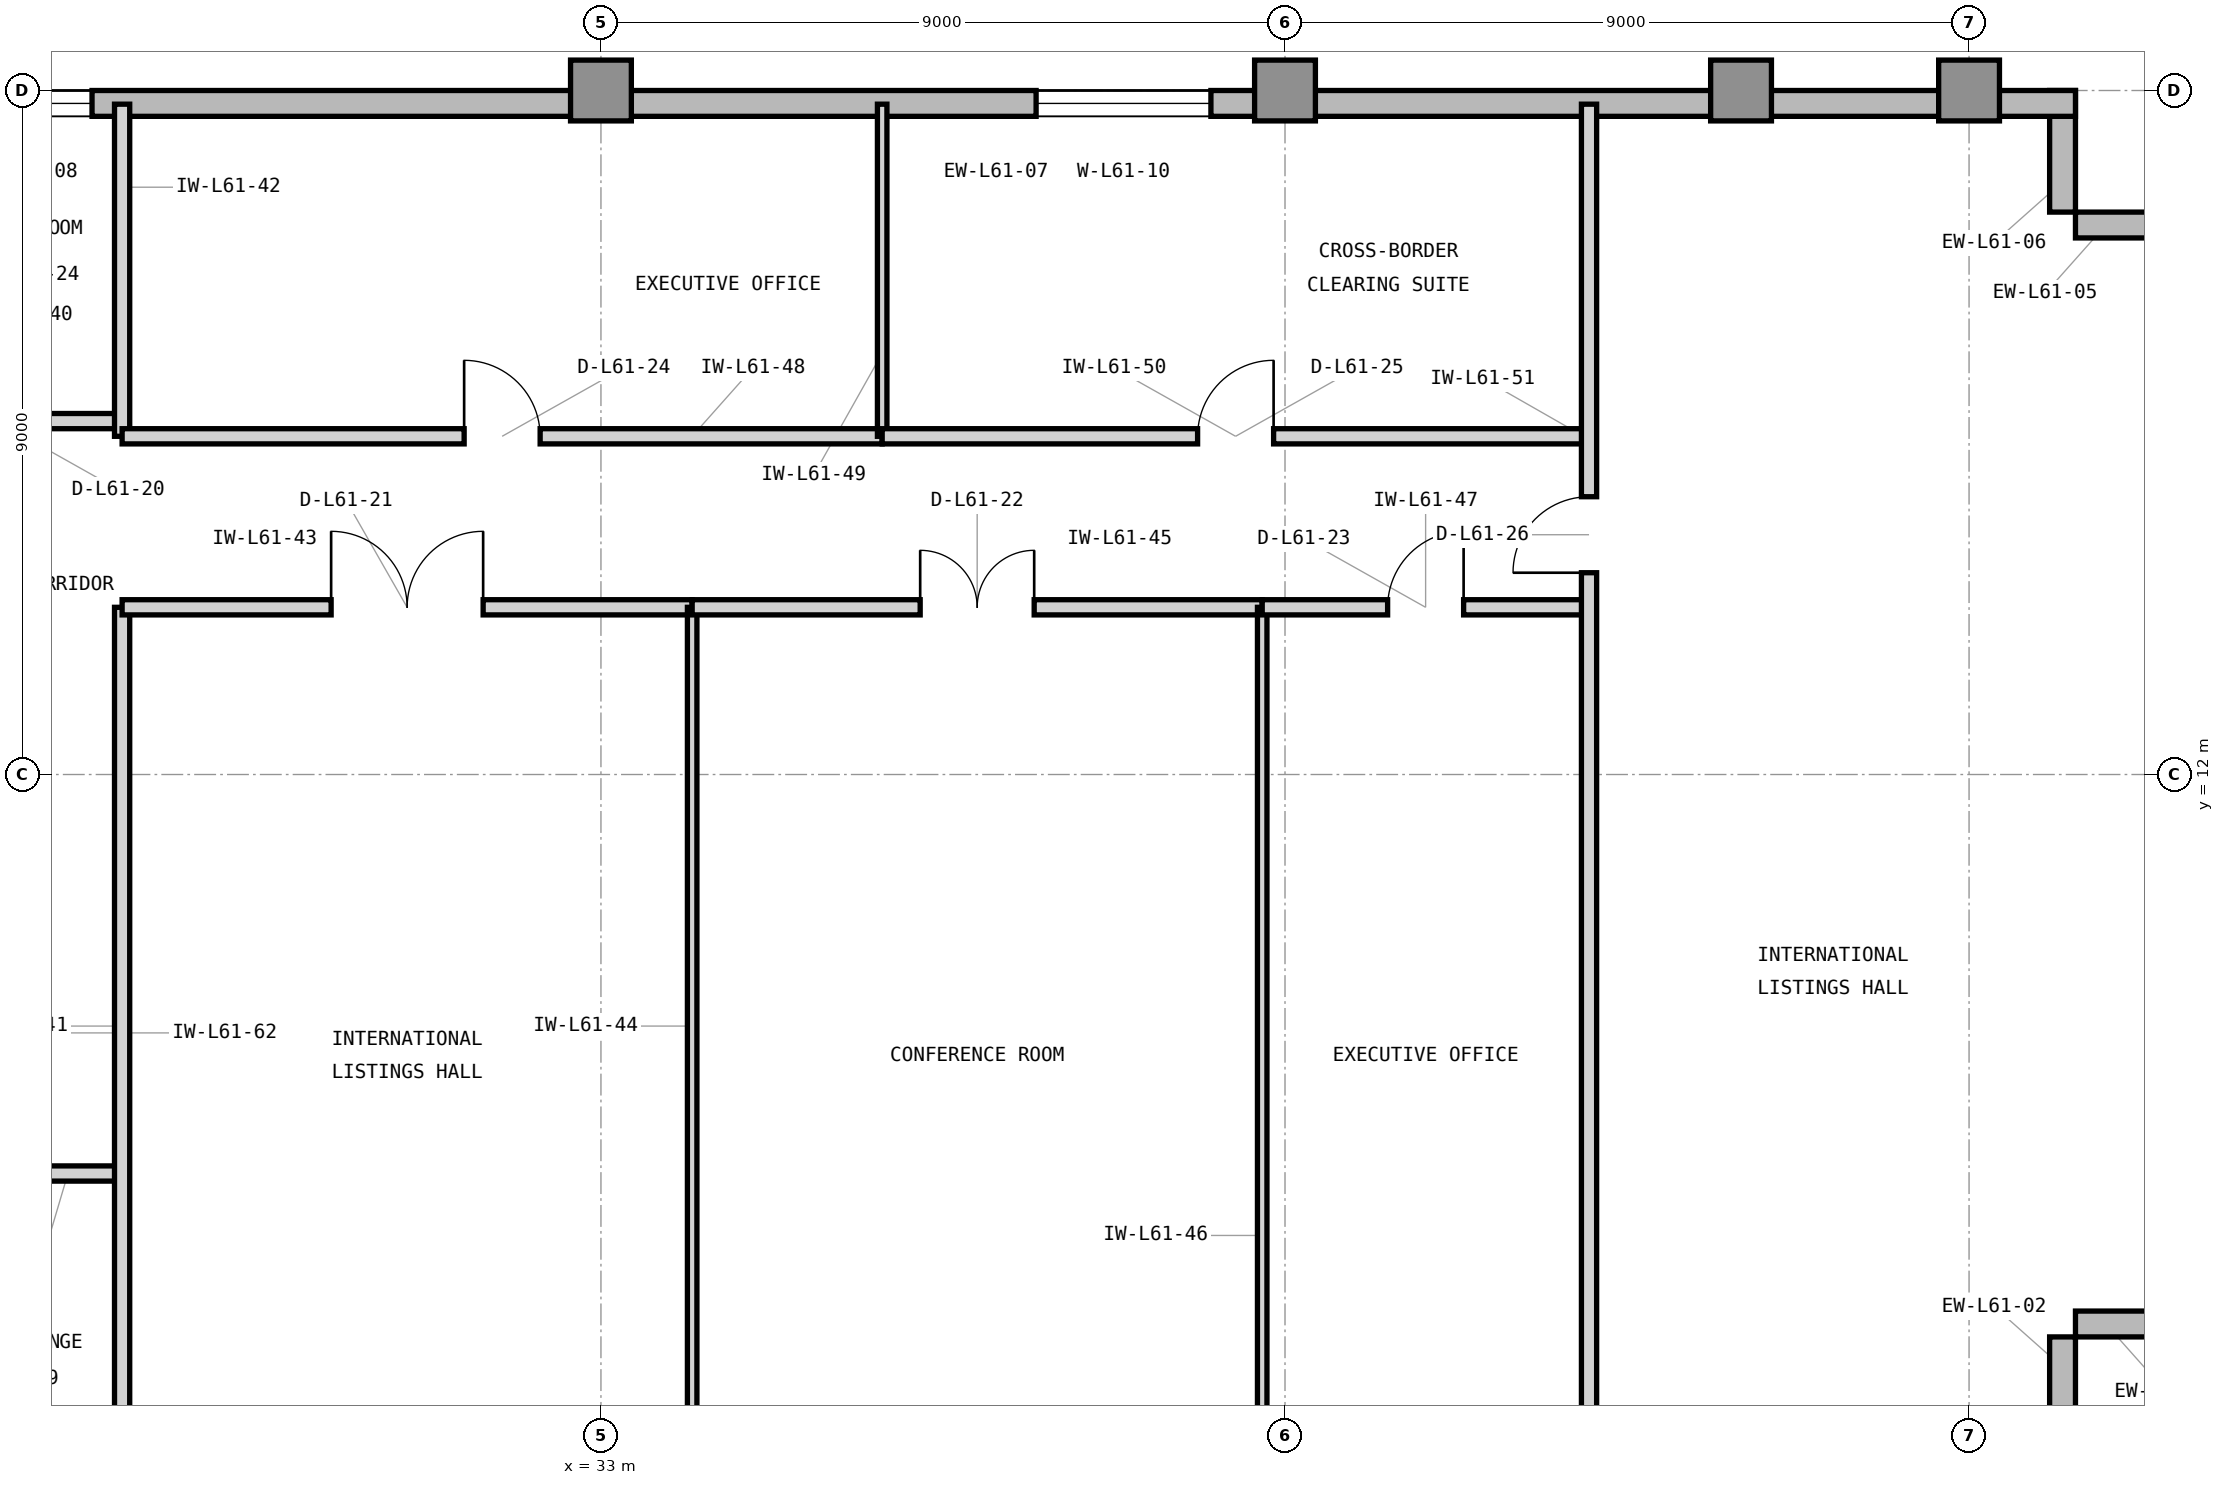
"""IFC4 building model, lengths in metres.
Left out: names, types, materials, properties, quantities, classifications, styles, units other than length and angle.
Written with IfcOpenShell. Run it as: python <this file> out.ifc"""

import sys

from ifc_helpers import new_model, si_unit, direction, frame, frame_2d, origin, origin_2d, place, context, subcontext, project, spatial, rectangle, extrude, element, fill, save


model = new_model("IFC4")
c1 = context("Model", 3, precision=1e-05, world=origin(), true_north=direction((0.0, 1.0)))
c2 = subcontext(c1, "Body", "Model", "MODEL_VIEW")
j1 = project(units=[si_unit("LENGTHUNIT", "METRE"), si_unit("PLANEANGLEUNIT", "RADIAN")], contexts=[c1])
p1 = place(None, origin())
s1 = spatial("IfcSite", under=j1, at=p1, CompositionType="ELEMENT")
p2 = place(p1, origin())
s2 = spatial("IfcBuilding", under=s1, at=p2, CompositionType="ELEMENT")
p3 = place(p2, frame((0.0, 0.0, 250.8)))
s3 = spatial("IfcBuildingStorey", under=s2, at=p3, CompositionType="ELEMENT", Elevation=250.8)
for number, where, z_axis, x_axis in (
    (1, (33.0, 21.0, 0.0), (0.0, 0.0, 1.0), (1.0, 0.0, 0.0)),
    (2, (42.0, 21.0, 0.0), (0.0, 0.0, 1.0), (1.0, 0.0, 0.0)),
    (3, (48.0, 21.0, 0.0), (0.0, 0.0, 1.0), (1.0, 0.0, 0.0)),
    (4, (51.0, 21.0, 0.0), (0.0, 0.0, 1.0), (1.0, 0.0, 0.0)),
):
    element("IfcColumn", number, at=place(p3, frame(where, z_axis=z_axis, x_axis=x_axis)), inside=s3, PredefinedType="COLUMN", context=c2, shape_type="SweptSolid", body=[
        extrude(rectangle(XDim=0.8, YDim=0.8, at=origin_2d()), origin(), (0.0, 0.0, 1.0), 3.9),
    ])
for number, where, z_axis, x_axis in (
    (5, (52.23, 3.0, 0.0), (0.0, 0.0, 1.0), (0.0, 1.0, 0.0)),
    (6, (52.4, 4.77, 0.0), (0.0, 0.0, 1.0), (1.0, 0.0, 0.0)),
    (7, (54.0, 19.23, 0.0), (0.0, 0.0, 1.0), (-1.0, 0.0, 0.0)),
    (8, (52.23, 19.4, 0.0), (0.0, 0.0, 1.0), (0.0, 1.0, 0.0)),
):
    element("IfcWall", number, at=place(p3, frame(where, z_axis=z_axis, x_axis=x_axis)), inside=s3, PredefinedType="STANDARD", context=c2, shape_type="SweptSolid", body=[
        extrude(rectangle(XDim=1.6, YDim=0.34, at=frame_2d((0.8, 0.0))), origin(), (0.0, 0.0, 1.0), 3.715),
    ])
p4 = place(p3, frame((52.4, 20.83, 0.0), z_axis=(0.0, 0.0, 1.0), x_axis=(-1.0, 0.0, 0.0)))
e9 = element("IfcWall", 9, at=p4, inside=s3, PredefinedType="STANDARD", context=c2, shape_type="SweptSolid", body=[
    extrude(rectangle(XDim=28.4, YDim=0.34, at=frame_2d((14.2, 0.0))), origin(), (0.0, 0.0, 1.0), 3.715),
])
p5 = place(p4, frame((26.096, 0.0, 0.9)))
e10 = element("IfcOpeningElement", 10, at=p5, cuts=e9, PredefinedType="OPENING", context=c2, shape_type="SweptSolid", body=[
    extrude(rectangle(XDim=1.6, YDim=2.2, at=frame_2d((0.8, 1.1))), frame((0.0, 0.18, 0.0), z_axis=(0.0, -1.0, 0.0), x_axis=(1.0, 0.0, 0.0)), (0.0, 0.0, 1.0), 0.36),
])
p6 = place(p4, frame((11.375, 0.0, 0.9)))
e11 = element("IfcOpeningElement", 11, at=p6, cuts=e9, PredefinedType="OPENING", context=c2, shape_type="SweptSolid", body=[
    extrude(rectangle(XDim=2.3, YDim=2.2, at=frame_2d((1.15, 1.1))), frame((0.0, 0.18, 0.0), z_axis=(0.0, -1.0, 0.0), x_axis=(1.0, 0.0, 0.0)), (0.0, 0.0, 1.0), 0.36),
])
p7 = place(p3, frame((23.85, 6.75, 0.0), z_axis=(0.0, 0.0, 1.0), x_axis=(1.0, 0.0, 0.0)))
e12 = element("IfcWall", 12, at=p7, inside=s3, PredefinedType="PARTITIONING", context=c2, shape_type="SweptSolid", body=[
    extrude(rectangle(XDim=2.85, YDim=0.2, at=frame_2d((1.425, 0.0))), origin(), (0.0, 0.0, 1.0), 3.63),
])
p8 = place(p7, frame((0.7, 0.0, 0.0)))
e13 = element("IfcOpeningElement", 13, at=p8, cuts=e12, PredefinedType="OPENING", context=c2, shape_type="SweptSolid", body=[
    extrude(rectangle(XDim=1.0, YDim=2.15, at=frame_2d((0.5, 1.075))), frame((0.0, 0.11, 0.0), z_axis=(0.0, -1.0, 0.0), x_axis=(1.0, 0.0, 0.0)), (0.0, 0.0, 1.0), 0.22),
])
p9 = place(p3, frame((23.85, 16.65, 0.0), z_axis=(0.0, 0.0, 1.0), x_axis=(1.0, 0.0, 0.0)))
e14 = element("IfcWall", 14, at=p9, inside=s3, PredefinedType="PARTITIONING", context=c2, shape_type="SweptSolid", body=[
    extrude(rectangle(XDim=2.85, YDim=0.2, at=frame_2d((1.425, 0.0))), origin(), (0.0, 0.0, 1.0), 3.63),
])
p10 = place(p9, frame((0.7, 0.0, 0.0)))
e15 = element("IfcOpeningElement", 15, at=p10, cuts=e14, PredefinedType="OPENING", context=c2, shape_type="SweptSolid", body=[
    extrude(rectangle(XDim=1.0, YDim=2.15, at=frame_2d((0.5, 1.075))), frame((0.0, 0.11, 0.0), z_axis=(0.0, -1.0, 0.0), x_axis=(1.0, 0.0, 0.0)), (0.0, 0.0, 1.0), 0.22),
])
p11 = place(p3, frame((26.7, 3.18, 0.0), z_axis=(0.0, 0.0, 1.0), x_axis=(0.0, 1.0, 0.0)))
e16 = element("IfcWall", 16, at=p11, inside=s3, PredefinedType="PARTITIONING", context=c2, shape_type="SweptSolid", body=[
    extrude(rectangle(XDim=11.02, YDim=0.2, at=frame_2d((5.51, 0.0))), origin(), (0.0, 0.0, 1.0), 3.63),
])
p12 = place(p3, frame((26.7, 16.45, 0.0), z_axis=(0.0, 0.0, 1.0), x_axis=(0.0, 1.0, 0.0)))
e17 = element("IfcWall", 17, at=p12, inside=s3, PredefinedType="PARTITIONING", context=c2, shape_type="SweptSolid", body=[
    extrude(rectangle(XDim=4.37, YDim=0.2, at=frame_2d((2.185, 0.0))), origin(), (0.0, 0.0, 1.0), 3.63),
])
p13 = place(p3, frame((26.7, 14.2, 0.0), z_axis=(0.0, 0.0, 1.0), x_axis=(1.0, 0.0, 0.0)))
e18 = element("IfcWall", 18, at=p13, inside=s3, PredefinedType="PARTITIONING", context=c2, shape_type="SweptSolid", body=[
    extrude(rectangle(XDim=7.5, YDim=0.2, at=frame_2d((3.75, 0.0))), origin(), (0.0, 0.0, 1.0), 3.63),
])
p14 = place(p13, frame((2.75, 0.0, 0.0)))
e19 = element("IfcOpeningElement", 19, at=p14, cuts=e18, PredefinedType="OPENING", context=c2, shape_type="SweptSolid", body=[
    extrude(rectangle(XDim=2.0, YDim=2.5, at=frame_2d((1.0, 1.25))), frame((0.0, 0.11, 0.0), z_axis=(0.0, -1.0, 0.0), x_axis=(1.0, 0.0, 0.0)), (0.0, 0.0, 1.0), 0.22),
])
p15 = place(p3, frame((34.2, 3.18, 0.0), z_axis=(0.0, 0.0, 1.0), x_axis=(0.0, 1.0, 0.0)))
e20 = element("IfcWall", 20, at=p15, inside=s3, PredefinedType="PARTITIONING", context=c2, shape_type="SweptSolid", body=[
    extrude(rectangle(XDim=11.02, YDim=0.125, at=frame_2d((5.51, 0.0))), origin(), (0.0, 0.0, 1.0), 3.63),
])
p16 = place(p3, frame((34.2, 14.2, 0.0), z_axis=(0.0, 0.0, 1.0), x_axis=(1.0, 0.0, 0.0)))
e21 = element("IfcWall", 21, at=p16, inside=s3, PredefinedType="PARTITIONING", context=c2, shape_type="SweptSolid", body=[
    extrude(rectangle(XDim=7.5, YDim=0.2, at=frame_2d((3.75, 0.0))), origin(), (0.0, 0.0, 1.0), 3.63),
])
p17 = place(p16, frame((3.0, 0.0, 0.0)))
e22 = element("IfcOpeningElement", 22, at=p17, cuts=e21, PredefinedType="OPENING", context=c2, shape_type="SweptSolid", body=[
    extrude(rectangle(XDim=1.5, YDim=2.3, at=frame_2d((0.75, 1.15))), frame((0.0, 0.11, 0.0), z_axis=(0.0, -1.0, 0.0), x_axis=(1.0, 0.0, 0.0)), (0.0, 0.0, 1.0), 0.22),
])
p18 = place(p3, frame((41.7, 3.18, 0.0), z_axis=(0.0, 0.0, 1.0), x_axis=(0.0, 1.0, 0.0)))
e23 = element("IfcWall", 23, at=p18, inside=s3, PredefinedType="PARTITIONING", context=c2, shape_type="SweptSolid", body=[
    extrude(rectangle(XDim=11.02, YDim=0.125, at=frame_2d((5.51, 0.0))), origin(), (0.0, 0.0, 1.0), 3.63),
])
p19 = place(p3, frame((41.7, 14.2, 0.0), z_axis=(0.0, 0.0, 1.0), x_axis=(1.0, 0.0, 0.0)))
e24 = element("IfcWall", 24, at=p19, inside=s3, PredefinedType="PARTITIONING", context=c2, shape_type="SweptSolid", body=[
    extrude(rectangle(XDim=4.3, YDim=0.2, at=frame_2d((2.15, 0.0))), origin(), (0.0, 0.0, 1.0), 3.63),
])
p20 = place(p19, frame((1.65, 0.0, 0.0)))
e25 = element("IfcOpeningElement", 25, at=p20, cuts=e24, PredefinedType="OPENING", context=c2, shape_type="SweptSolid", body=[
    extrude(rectangle(XDim=1.0, YDim=2.15, at=frame_2d((0.5, 1.075))), frame((0.0, 0.11, 0.0), z_axis=(0.0, -1.0, 0.0), x_axis=(1.0, 0.0, 0.0)), (0.0, 0.0, 1.0), 0.22),
])
p21 = place(p3, frame((26.7, 16.45, 0.0), z_axis=(0.0, 0.0, 1.0), x_axis=(1.0, 0.0, 0.0)))
e26 = element("IfcWall", 26, at=p21, inside=s3, PredefinedType="PARTITIONING", context=c2, shape_type="SweptSolid", body=[
    extrude(rectangle(XDim=10.0, YDim=0.2, at=frame_2d((5.0, 0.0))), origin(), (0.0, 0.0, 1.0), 3.63),
])
p22 = place(p21, frame((4.5, 0.0, 0.0)))
e27 = element("IfcOpeningElement", 27, at=p22, cuts=e26, PredefinedType="OPENING", context=c2, shape_type="SweptSolid", body=[
    extrude(rectangle(XDim=1.0, YDim=2.15, at=frame_2d((0.5, 1.075))), frame((0.0, 0.11, 0.0), z_axis=(0.0, -1.0, 0.0), x_axis=(1.0, 0.0, 0.0)), (0.0, 0.0, 1.0), 0.22),
])
p23 = place(p3, frame((36.7, 16.45, 0.0), z_axis=(0.0, 0.0, 1.0), x_axis=(0.0, 1.0, 0.0)))
e28 = element("IfcWall", 28, at=p23, inside=s3, PredefinedType="PARTITIONING", context=c2, shape_type="SweptSolid", body=[
    extrude(rectangle(XDim=4.37, YDim=0.125, at=frame_2d((2.185, 0.0))), origin(), (0.0, 0.0, 1.0), 3.63),
])
p24 = place(p3, frame((36.7, 16.45, 0.0), z_axis=(0.0, 0.0, 1.0), x_axis=(1.0, 0.0, 0.0)))
e29 = element("IfcWall", 29, at=p24, inside=s3, PredefinedType="PARTITIONING", context=c2, shape_type="SweptSolid", body=[
    extrude(rectangle(XDim=9.3, YDim=0.2, at=frame_2d((4.65, 0.0))), origin(), (0.0, 0.0, 1.0), 3.63),
])
p25 = place(p24, frame((4.15, 0.0, 0.0)))
e30 = element("IfcOpeningElement", 30, at=p25, cuts=e29, PredefinedType="OPENING", context=c2, shape_type="SweptSolid", body=[
    extrude(rectangle(XDim=1.0, YDim=2.15, at=frame_2d((0.5, 1.075))), frame((0.0, 0.11, 0.0), z_axis=(0.0, -1.0, 0.0), x_axis=(1.0, 0.0, 0.0)), (0.0, 0.0, 1.0), 0.22),
])
p26 = place(p3, frame((46.0, 3.18, 0.0), z_axis=(0.0, 0.0, 1.0), x_axis=(0.0, 1.0, 0.0)))
e31 = element("IfcWall", 31, at=p26, inside=s3, PredefinedType="PARTITIONING", context=c2, shape_type="SweptSolid", body=[
    extrude(rectangle(XDim=17.64, YDim=0.2, at=frame_2d((8.82, 0.0))), origin(), (0.0, 0.0, 1.0), 3.63),
])
p27 = place(p26, frame((11.475, 0.0, 0.0)))
e32 = element("IfcOpeningElement", 32, at=p27, cuts=e31, PredefinedType="OPENING", context=c2, shape_type="SweptSolid", body=[
    extrude(rectangle(XDim=1.0, YDim=2.15, at=frame_2d((0.5, 1.075))), frame((0.0, 0.11, 0.0), z_axis=(0.0, -1.0, 0.0), x_axis=(1.0, 0.0, 0.0)), (0.0, 0.0, 1.0), 0.22),
])
p28 = place(p14, origin())
e33 = element("IfcDoor", 33, at=p28, inside=s3, OperationType="DOUBLE_DOOR_SINGLE_SWING", PredefinedType="DOOR", context=c2, shape_type="SweptSolid", body=[
    extrude(rectangle(XDim=2.0, YDim=2.5, at=frame_2d((1.0, 1.25))), frame((0.0, 0.025, 0.0), z_axis=(0.0, -1.0, 0.0), x_axis=(1.0, 0.0, 0.0)), (0.0, 0.0, 1.0), 0.05),
])
fill(e19, e33)
p29 = place(p17, origin())
e34 = element("IfcDoor", 34, at=p29, inside=s3, OperationType="DOUBLE_DOOR_SINGLE_SWING", PredefinedType="DOOR", context=c2, shape_type="SweptSolid", body=[
    extrude(rectangle(XDim=1.5, YDim=2.3, at=frame_2d((0.75, 1.15))), frame((0.0, 0.025, 0.0), z_axis=(0.0, -1.0, 0.0), x_axis=(1.0, 0.0, 0.0)), (0.0, 0.0, 1.0), 0.05),
])
fill(e22, e34)
p30 = place(p20, origin())
e35 = element("IfcDoor", 35, at=p30, inside=s3, OperationType="SINGLE_SWING_RIGHT", PredefinedType="DOOR", context=c2, shape_type="SweptSolid", body=[
    extrude(rectangle(XDim=1.0, YDim=2.15, at=frame_2d((0.5, 1.075))), frame((0.0, 0.025, 0.0), z_axis=(0.0, -1.0, 0.0), x_axis=(1.0, 0.0, 0.0)), (0.0, 0.0, 1.0), 0.05),
])
fill(e25, e35)
p31 = place(p22, origin())
e36 = element("IfcDoor", 36, at=p31, inside=s3, OperationType="SINGLE_SWING_LEFT", PredefinedType="DOOR", context=c2, shape_type="SweptSolid", body=[
    extrude(rectangle(XDim=1.0, YDim=2.15, at=frame_2d((0.5, 1.075))), frame((0.0, 0.025, 0.0), z_axis=(0.0, -1.0, 0.0), x_axis=(1.0, 0.0, 0.0)), (0.0, 0.0, 1.0), 0.05),
])
fill(e27, e36)
p32 = place(p25, origin())
e37 = element("IfcDoor", 37, at=p32, inside=s3, OperationType="SINGLE_SWING_RIGHT", PredefinedType="DOOR", context=c2, shape_type="SweptSolid", body=[
    extrude(rectangle(XDim=1.0, YDim=2.15, at=frame_2d((0.5, 1.075))), frame((0.0, 0.025, 0.0), z_axis=(0.0, -1.0, 0.0), x_axis=(1.0, 0.0, 0.0)), (0.0, 0.0, 1.0), 0.05),
])
fill(e30, e37)
p33 = place(p27, origin())
e38 = element("IfcDoor", 38, at=p33, inside=s3, OperationType="SINGLE_SWING_LEFT", PredefinedType="DOOR", context=c2, shape_type="SweptSolid", body=[
    extrude(rectangle(XDim=1.0, YDim=2.15, at=frame_2d((0.5, 1.075))), frame((0.0, 0.025, 0.0), z_axis=(0.0, -1.0, 0.0), x_axis=(1.0, 0.0, 0.0)), (0.0, 0.0, 1.0), 0.05),
])
fill(e32, e38)
p34 = place(p5, origin())
e39 = element("IfcWindow", 39, at=p34, inside=s3, PartitioningType="SINGLE_PANEL", PredefinedType="WINDOW", context=c2, shape_type="SweptSolid", body=[
    extrude(rectangle(XDim=1.6, YDim=2.2, at=frame_2d((0.8, 1.1))), frame((0.0, 0.11, 0.0), z_axis=(0.0, -1.0, 0.0), x_axis=(1.0, 0.0, 0.0)), (0.0, 0.0, 1.0), 0.06),
])
fill(e10, e39)
p35 = place(p6, origin())
e40 = element("IfcWindow", 40, at=p35, inside=s3, PartitioningType="SINGLE_PANEL", PredefinedType="WINDOW", context=c2, shape_type="SweptSolid", body=[
    extrude(rectangle(XDim=2.3, YDim=2.2, at=frame_2d((1.15, 1.1))), frame((0.0, 0.11, 0.0), z_axis=(0.0, -1.0, 0.0), x_axis=(1.0, 0.0, 0.0)), (0.0, 0.0, 1.0), 0.06),
])
fill(e11, e40)
save(model, sys.argv[1])
